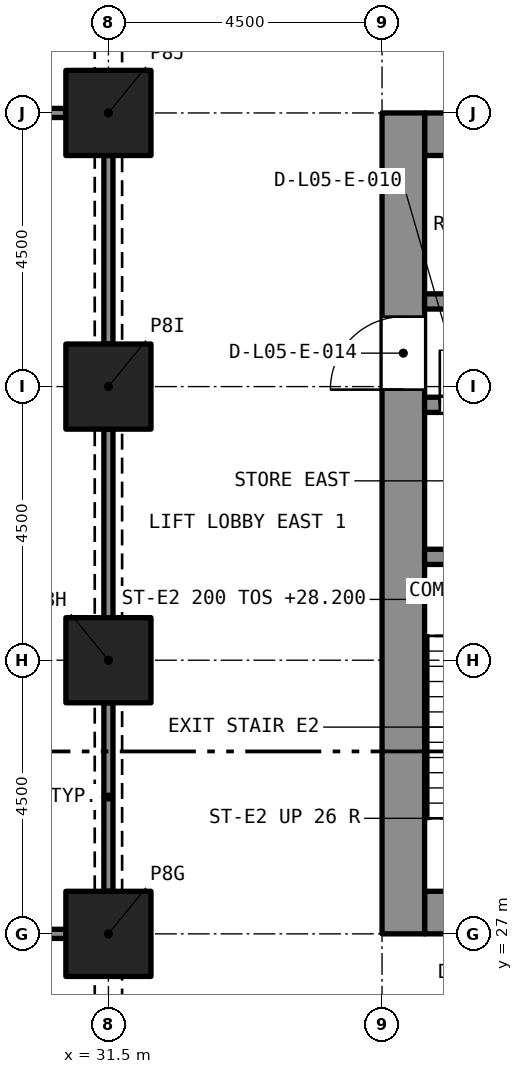
"""IFC4 building model, lengths in metres.
Left out: names, types, materials, properties, quantities, classifications, styles, units other than length and angle.
Written with IfcOpenShell. Run it as: python <this file> out.ifc"""

import sys

from ifc_helpers import new_model, si_unit, direction, frame, frame_2d, origin, origin_2d, place, context, subcontext, project, spatial, rectangle, extrude, element, fill, save


model = new_model("IFC4")
c1 = context("Model", 3, precision=1e-05, world=origin(), true_north=direction((0.0, 1.0)))
c2 = subcontext(c1, "Body", "Model", "MODEL_VIEW")
j1 = project(units=[si_unit("LENGTHUNIT", "METRE"), si_unit("PLANEANGLEUNIT", "RADIAN")], contexts=[c1])
p1 = place(None, origin())
s1 = spatial("IfcSite", under=j1, at=p1, CompositionType="ELEMENT")
p2 = place(p1, origin())
s2 = spatial("IfcBuilding", under=s1, at=p2, CompositionType="ELEMENT")
p3 = place(p2, frame((0.0, 0.0, 26.0)))
s3 = spatial("IfcBuildingStorey", under=s2, at=p3, CompositionType="ELEMENT", Elevation=26.0)
for number, where, z_axis, x_axis in (
    (1, (31.5, 27.0, 0.0), (0.0, 0.0, 1.0), (1.0, 0.0, 0.0)),
    (2, (31.5, 31.5, 0.0), (0.0, 0.0, 1.0), (1.0, 0.0, 0.0)),
    (3, (31.5, 36.0, 0.0), (0.0, 0.0, 1.0), (1.0, 0.0, 0.0)),
    (4, (31.5, 40.5, 0.0), (0.0, 0.0, 1.0), (1.0, 0.0, 0.0)),
):
    element("IfcColumn", number, at=place(p3, frame(where, z_axis=z_axis, x_axis=x_axis)), inside=s3, PredefinedType="COLUMN", context=c2, shape_type="SweptSolid", body=[
        extrude(rectangle(XDim=1.4, YDim=1.4, at=origin_2d()), origin(), (0.0, 0.0, 1.0), 4.4),
    ])
p4 = place(p3, frame((36.7, 27.35, 0.0), z_axis=(0.0, 0.0, 1.0), x_axis=(1.0, 0.0, 0.0)))
e5 = element("IfcWall", 5, at=p4, inside=s3, PredefinedType="SOLIDWALL", context=c2, shape_type="SweptSolid", body=[
    extrude(rectangle(XDim=7.6, YDim=0.7, at=frame_2d((3.8, 0.0))), origin(), (0.0, 0.0, 1.0), 4.4),
])
p5 = place(p4, frame((5.775, 0.0, 0.0)))
e6 = element("IfcOpeningElement", 6, at=p5, cuts=e5, PredefinedType="OPENING", context=c2, shape_type="SweptSolid", body=[
    extrude(rectangle(XDim=1.1, YDim=2.1, at=frame_2d((0.55, 1.05))), frame((0.0, 0.36, 0.0), z_axis=(0.0, -1.0, 0.0), x_axis=(1.0, 0.0, 0.0)), (0.0, 0.0, 1.0), 0.72),
])
p6 = place(p4, frame((3.25, 0.0, 0.0)))
e7 = element("IfcOpeningElement", 7, at=p6, cuts=e5, PredefinedType="OPENING", context=c2, shape_type="SweptSolid", body=[
    extrude(rectangle(XDim=1.1, YDim=2.1, at=frame_2d((0.55, 1.05))), frame((0.0, 0.36, 0.0), z_axis=(0.0, -1.0, 0.0), x_axis=(1.0, 0.0, 0.0)), (0.0, 0.0, 1.0), 0.72),
])
p7 = place(p4, frame((0.725, 0.0, 0.0)))
e8 = element("IfcOpeningElement", 8, at=p7, cuts=e5, PredefinedType="OPENING", context=c2, shape_type="SweptSolid", body=[
    extrude(rectangle(XDim=1.1, YDim=2.1, at=frame_2d((0.55, 1.05))), frame((0.0, 0.36, 0.0), z_axis=(0.0, -1.0, 0.0), x_axis=(1.0, 0.0, 0.0)), (0.0, 0.0, 1.0), 0.72),
])
p8 = place(p3, frame((36.7, 40.15, 0.0), z_axis=(0.0, 0.0, 1.0), x_axis=(1.0, 0.0, 0.0)))
e9 = element("IfcWall", 9, at=p8, inside=s3, PredefinedType="SOLIDWALL", context=c2, shape_type="SweptSolid", body=[
    extrude(rectangle(XDim=7.6, YDim=0.7, at=frame_2d((3.8, 0.0))), origin(), (0.0, 0.0, 1.0), 4.4),
])
p9 = place(p3, frame((36.35, 27.0, 0.0), z_axis=(0.0, 0.0, 1.0), x_axis=(0.0, 1.0, 0.0)))
e10 = element("IfcWall", 10, at=p9, inside=s3, PredefinedType="SOLIDWALL", context=c2, shape_type="SweptSolid", body=[
    extrude(rectangle(XDim=13.5, YDim=0.7, at=frame_2d((6.75, 0.0))), origin(), (0.0, 0.0, 1.0), 4.4),
])
p10 = place(p9, frame((8.95, 0.0, 0.0)))
e11 = element("IfcOpeningElement", 11, at=p10, cuts=e10, PredefinedType="OPENING", context=c2, shape_type="SweptSolid", body=[
    extrude(rectangle(XDim=1.2, YDim=2.1, at=frame_2d((0.6, 1.05))), frame((0.0, 0.36, 0.0), z_axis=(0.0, -1.0, 0.0), x_axis=(1.0, 0.0, 0.0)), (0.0, 0.0, 1.0), 0.72),
])
p11 = place(p3, frame((36.7, 33.2, 0.0), z_axis=(0.0, 0.0, 1.0), x_axis=(1.0, 0.0, 0.0)))
e12 = element("IfcWall", 12, at=p11, inside=s3, PredefinedType="SOLIDWALL", context=c2, shape_type="SweptSolid", body=[
    extrude(rectangle(XDim=7.6, YDim=0.25, at=frame_2d((3.8, 0.0))), origin(), (0.0, 0.0, 1.0), 4.1),
])
p12 = place(p11, frame((3.3, 0.0, 0.0)))
e13 = element("IfcOpeningElement", 13, at=p12, cuts=e12, PredefinedType="OPENING", context=c2, shape_type="SweptSolid", body=[
    extrude(rectangle(XDim=1.0, YDim=2.1, at=frame_2d((0.5, 1.05))), frame((0.0, 0.135, 0.0), z_axis=(0.0, -1.0, 0.0), x_axis=(1.0, 0.0, 0.0)), (0.0, 0.0, 1.0), 0.27),
])
p13 = place(p3, frame((36.7, 35.7, 0.0), z_axis=(0.0, 0.0, 1.0), x_axis=(1.0, 0.0, 0.0)))
e14 = element("IfcWall", 14, at=p13, inside=s3, PredefinedType="SOLIDWALL", context=c2, shape_type="SweptSolid", body=[
    extrude(rectangle(XDim=7.6, YDim=0.25, at=frame_2d((3.8, 0.0))), origin(), (0.0, 0.0, 1.0), 4.1),
])
p14 = place(p13, frame((6.725, 0.0, 0.0)))
e15 = element("IfcOpeningElement", 15, at=p14, cuts=e14, PredefinedType="OPENING", context=c2, shape_type="SweptSolid", body=[
    extrude(rectangle(XDim=0.8, YDim=2.1, at=frame_2d((0.4, 1.05))), frame((0.0, 0.135, 0.0), z_axis=(0.0, -1.0, 0.0), x_axis=(1.0, 0.0, 0.0)), (0.0, 0.0, 1.0), 0.27),
])
p15 = place(p13, frame((5.3, 0.0, 0.0)))
e16 = element("IfcOpeningElement", 16, at=p15, cuts=e14, PredefinedType="OPENING", context=c2, shape_type="SweptSolid", body=[
    extrude(rectangle(XDim=0.9, YDim=2.1, at=frame_2d((0.45, 1.05))), frame((0.0, 0.135, 0.0), z_axis=(0.0, -1.0, 0.0), x_axis=(1.0, 0.0, 0.0)), (0.0, 0.0, 1.0), 0.27),
])
p16 = place(p13, frame((1.675, 0.0, 0.0)))
e17 = element("IfcOpeningElement", 17, at=p16, cuts=e14, PredefinedType="OPENING", context=c2, shape_type="SweptSolid", body=[
    extrude(rectangle(XDim=0.8, YDim=2.1, at=frame_2d((0.4, 1.05))), frame((0.0, 0.135, 0.0), z_axis=(0.0, -1.0, 0.0), x_axis=(1.0, 0.0, 0.0)), (0.0, 0.0, 1.0), 0.27),
])
p17 = place(p13, frame((0.25, 0.0, 0.0)))
e18 = element("IfcOpeningElement", 18, at=p17, cuts=e14, PredefinedType="OPENING", context=c2, shape_type="SweptSolid", body=[
    extrude(rectangle(XDim=0.9, YDim=2.1, at=frame_2d((0.45, 1.05))), frame((0.0, 0.135, 0.0), z_axis=(0.0, -1.0, 0.0), x_axis=(1.0, 0.0, 0.0)), (0.0, 0.0, 1.0), 0.27),
])
p18 = place(p3, frame((36.7, 37.4, 0.0), z_axis=(0.0, 0.0, 1.0), x_axis=(1.0, 0.0, 0.0)))
e19 = element("IfcWall", 19, at=p18, inside=s3, PredefinedType="SOLIDWALL", context=c2, shape_type="SweptSolid", body=[
    extrude(rectangle(XDim=7.6, YDim=0.25, at=frame_2d((3.8, 0.0))), origin(), (0.0, 0.0, 1.0), 4.1),
])
p19 = place(p18, frame((5.8, 0.0, 0.0)))
e20 = element("IfcOpeningElement", 20, at=p19, cuts=e19, PredefinedType="OPENING", context=c2, shape_type="SweptSolid", body=[
    extrude(rectangle(XDim=1.1, YDim=2.4, at=frame_2d((0.55, 1.2))), frame((0.0, 0.135, 0.0), z_axis=(0.0, -1.0, 0.0), x_axis=(1.0, 0.0, 0.0)), (0.0, 0.0, 1.0), 0.27),
])
p20 = place(p18, frame((3.1, 0.0, 0.0)))
e21 = element("IfcOpeningElement", 21, at=p20, cuts=e19, PredefinedType="OPENING", context=c2, shape_type="SweptSolid", body=[
    extrude(rectangle(XDim=1.1, YDim=2.4, at=frame_2d((0.55, 1.2))), frame((0.0, 0.135, 0.0), z_axis=(0.0, -1.0, 0.0), x_axis=(1.0, 0.0, 0.0)), (0.0, 0.0, 1.0), 0.27),
])
p21 = place(p18, frame((0.75, 0.0, 0.0)))
e22 = element("IfcOpeningElement", 22, at=p21, cuts=e19, PredefinedType="OPENING", context=c2, shape_type="SweptSolid", body=[
    extrude(rectangle(XDim=0.7, YDim=2.1, at=frame_2d((0.35, 1.05))), frame((0.0, 0.135, 0.0), z_axis=(0.0, -1.0, 0.0), x_axis=(1.0, 0.0, 0.0)), (0.0, 0.0, 1.0), 0.27),
])
p22 = place(p3, frame((18.7, 27.0, 0.0), z_axis=(0.0, 0.0, 1.0), x_axis=(1.0, 0.0, 0.0)))
e23 = element("IfcWall", 23, at=p22, inside=s3, PredefinedType="PARTITIONING", context=c2, shape_type="SweptSolid", body=[
    extrude(rectangle(XDim=12.1, YDim=0.15, at=frame_2d((6.05, 0.0))), origin(), (0.0, 0.0, 1.0), 3.95),
])
p23 = place(p22, frame((5.45, 0.0, 0.0)))
e24 = element("IfcOpeningElement", 24, at=p23, cuts=e23, PredefinedType="OPENING", context=c2, shape_type="SweptSolid", body=[
    extrude(rectangle(XDim=1.2, YDim=2.1, at=frame_2d((0.6, 1.05))), frame((0.0, 0.085, 0.0), z_axis=(0.0, -1.0, 0.0), x_axis=(1.0, 0.0, 0.0)), (0.0, 0.0, 1.0), 0.17),
])
p24 = place(p3, frame((18.7, 40.5, 0.0), z_axis=(0.0, 0.0, 1.0), x_axis=(1.0, 0.0, 0.0)))
e25 = element("IfcWall", 25, at=p24, inside=s3, PredefinedType="PARTITIONING", context=c2, shape_type="SweptSolid", body=[
    extrude(rectangle(XDim=12.1, YDim=0.15, at=frame_2d((6.05, 0.0))), origin(), (0.0, 0.0, 1.0), 3.95),
])
for number, where, z_axis, x_axis in (
    (26, (31.5, 36.7, 0.0), (0.0, 0.0, 1.0), (0.0, 1.0, 0.0)),
    (27, (31.5, 32.2, 0.0), (0.0, 0.0, 1.0), (0.0, 1.0, 0.0)),
    (28, (31.5, 27.7, 0.0), (0.0, 0.0, 1.0), (0.0, 1.0, 0.0)),
):
    element("IfcWall", number, at=place(p3, frame(where, z_axis=z_axis, x_axis=x_axis)), inside=s3, PredefinedType="PARTITIONING", context=c2, shape_type="SweptSolid", body=[
        extrude(rectangle(XDim=3.1, YDim=0.15, at=frame_2d((1.55, 0.0))), origin(), (0.0, 0.0, 1.0), 3.58),
    ])
p25 = place(p17, origin())
e29 = element("IfcDoor", 29, at=p25, inside=s3, OperationType="SINGLE_SWING_LEFT", PredefinedType="DOOR", context=c2, shape_type="SweptSolid", body=[
    extrude(rectangle(XDim=0.9, YDim=2.1, at=frame_2d((0.45, 1.05))), frame((0.0, 0.025, 0.0), z_axis=(0.0, -1.0, 0.0), x_axis=(1.0, 0.0, 0.0)), (0.0, 0.0, 1.0), 0.05),
])
fill(e18, e29)
p26 = place(p10, origin())
e30 = element("IfcDoor", 30, at=p26, inside=s3, OperationType="SINGLE_SWING_LEFT", PredefinedType="DOOR", context=c2, shape_type="SweptSolid", body=[
    extrude(rectangle(XDim=1.2, YDim=2.1, at=frame_2d((0.6, 1.05))), frame((0.0, 0.025, 0.0), z_axis=(0.0, -1.0, 0.0), x_axis=(1.0, 0.0, 0.0)), (0.0, 0.0, 1.0), 0.05),
])
fill(e11, e30)
save(model, sys.argv[1])
